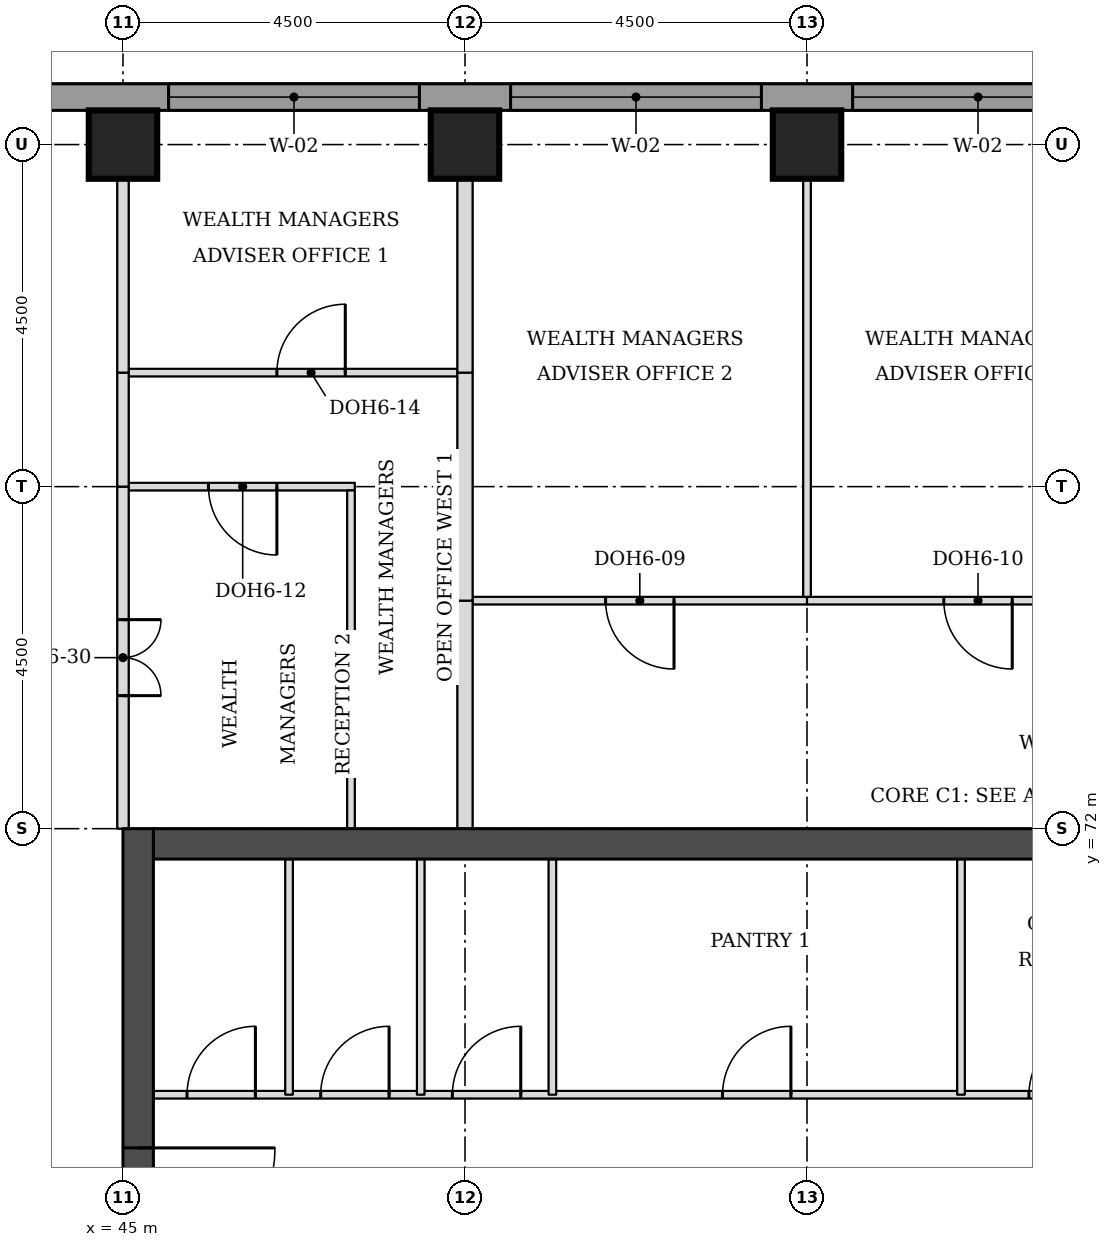
"""IFC4 building model, lengths in metres.
Left out: names, types, materials, properties, quantities, classifications, styles, units other than length and angle.
Written with IfcOpenShell. Run it as: python <this file> out.ifc"""

import sys

from ifc_helpers import new_model, si_unit, direction, frame, frame_2d, origin, origin_2d, place, context, subcontext, project, spatial, rectangle, extrude, element, fill, save


model = new_model("IFC4")
c1 = context("Model", 3, precision=1e-05, world=origin(), true_north=direction((0.0, 1.0)))
c2 = subcontext(c1, "Body", "Model", "MODEL_VIEW")
j1 = project(units=[si_unit("LENGTHUNIT", "METRE"), si_unit("PLANEANGLEUNIT", "RADIAN")], contexts=[c1])
p1 = place(None, origin())
s1 = spatial("IfcSite", under=j1, at=p1, CompositionType="ELEMENT")
p2 = place(p1, origin())
s2 = spatial("IfcBuilding", under=s1, at=p2, CompositionType="ELEMENT")
p3 = place(p2, frame((0.0, 0.0, 184.7)))
s3 = spatial("IfcBuildingStorey", under=s2, at=p3, CompositionType="ELEMENT", Elevation=184.7)
for number, where, z_axis, x_axis in (
    (1, (45.0, 81.0, 0.0), (0.0, 0.0, 1.0), (1.0, 0.0, 0.0)),
    (2, (49.5, 81.0, 0.0), (0.0, 0.0, 1.0), (1.0, 0.0, 0.0)),
    (3, (54.0, 81.0, 0.0), (0.0, 0.0, 1.0), (1.0, 0.0, 0.0)),
):
    element("IfcColumn", number, at=place(p3, frame(where, z_axis=z_axis, x_axis=x_axis)), inside=s3, PredefinedType="COLUMN", context=c2, shape_type="SweptSolid", body=[
        extrude(rectangle(XDim=0.9, YDim=0.9, at=origin_2d()), origin(), (0.0, 0.0, 1.0), 3.7),
    ])
p4 = place(p3, frame((45.4, 71.8, 0.0), z_axis=(0.0, 0.0, 1.0), x_axis=(1.0, 0.0, 0.0)))
e4 = element("IfcWall", 4, at=p4, inside=s3, PredefinedType="SHEAR", context=c2, shape_type="SweptSolid", body=[
    extrude(rectangle(XDim=21.7, YDim=0.4, at=frame_2d((10.85, 0.0))), origin(), (0.0, 0.0, 1.0), 3.7),
])
p5 = place(p3, frame((45.2, 49.5, 0.0), z_axis=(0.0, 0.0, 1.0), x_axis=(0.0, 1.0, 0.0)))
e5 = element("IfcWall", 5, at=p5, inside=s3, PredefinedType="SHEAR", context=c2, shape_type="SweptSolid", body=[
    extrude(rectangle(XDim=22.5, YDim=0.4, at=frame_2d((11.25, 0.0))), origin(), (0.0, 0.0, 1.0), 3.7),
])
p6 = place(p5, frame((4.2, 0.0, 0.0)))
e6 = element("IfcOpeningElement", 6, at=p6, cuts=e5, PredefinedType="OPENING", context=c2, shape_type="SweptSolid", body=[
    extrude(rectangle(XDim=1.8, YDim=2.1, at=frame_2d((0.9, 1.05))), frame((0.0, 0.21, 0.0), z_axis=(0.0, -1.0, 0.0), x_axis=(1.0, 0.0, 0.0)), (0.0, 0.0, 1.0), 0.42),
])
p7 = place(p5, frame((6.9, 0.0, 0.0)))
e7 = element("IfcOpeningElement", 7, at=p7, cuts=e5, PredefinedType="OPENING", context=c2, shape_type="SweptSolid", body=[
    extrude(rectangle(XDim=1.1, YDim=2.1, at=frame_2d((0.55, 1.05))), frame((0.0, 0.21, 0.0), z_axis=(0.0, -1.0, 0.0), x_axis=(1.0, 0.0, 0.0)), (0.0, 0.0, 1.0), 0.42),
])
p8 = place(p5, frame((13.6, 0.0, 0.0)))
e8 = element("IfcOpeningElement", 8, at=p8, cuts=e5, PredefinedType="OPENING", context=c2, shape_type="SweptSolid", body=[
    extrude(rectangle(XDim=1.1, YDim=2.1, at=frame_2d((0.55, 1.05))), frame((0.0, 0.21, 0.0), z_axis=(0.0, -1.0, 0.0), x_axis=(1.0, 0.0, 0.0)), (0.0, 0.0, 1.0), 0.42),
])
p9 = place(p5, frame((16.5, 0.0, 0.0)))
e9 = element("IfcOpeningElement", 9, at=p9, cuts=e5, PredefinedType="OPENING", context=c2, shape_type="SweptSolid", body=[
    extrude(rectangle(XDim=1.8, YDim=2.1, at=frame_2d((0.9, 1.05))), frame((0.0, 0.21, 0.0), z_axis=(0.0, -1.0, 0.0), x_axis=(1.0, 0.0, 0.0)), (0.0, 0.0, 1.0), 0.42),
])
p10 = place(p3, frame((72.331, 81.625, 0.0), z_axis=(0.0, 0.0, 1.0), x_axis=(-1.0, 0.0, 0.0)))
e10 = element("IfcWall", 10, at=p10, inside=s3, PredefinedType="STANDARD", context=c2, shape_type="SweptSolid", body=[
    extrude(rectangle(XDim=32.163, YDim=0.35, at=frame_2d((16.081, 0.0))), origin(), (0.0, 0.0, 1.0), 3.525),
])
p11 = place(p10, frame((5.431, 0.0, 0.9)))
e11 = element("IfcOpeningElement", 11, at=p11, cuts=e10, PredefinedType="OPENING", context=c2, shape_type="SweptSolid", body=[
    extrude(rectangle(XDim=3.3, YDim=1.9, at=frame_2d((1.65, 0.95))), frame((0.0, 0.185, 0.0), z_axis=(0.0, -1.0, 0.0), x_axis=(1.0, 0.0, 0.0)), (0.0, 0.0, 1.0), 0.37),
])
p12 = place(p10, frame((9.931, 0.0, 0.9)))
e12 = element("IfcOpeningElement", 12, at=p12, cuts=e10, PredefinedType="OPENING", context=c2, shape_type="SweptSolid", body=[
    extrude(rectangle(XDim=3.3, YDim=1.9, at=frame_2d((1.65, 0.95))), frame((0.0, 0.185, 0.0), z_axis=(0.0, -1.0, 0.0), x_axis=(1.0, 0.0, 0.0)), (0.0, 0.0, 1.0), 0.37),
])
p13 = place(p10, frame((14.431, 0.0, 0.9)))
e13 = element("IfcOpeningElement", 13, at=p13, cuts=e10, PredefinedType="OPENING", context=c2, shape_type="SweptSolid", body=[
    extrude(rectangle(XDim=3.3, YDim=1.9, at=frame_2d((1.65, 0.95))), frame((0.0, 0.185, 0.0), z_axis=(0.0, -1.0, 0.0), x_axis=(1.0, 0.0, 0.0)), (0.0, 0.0, 1.0), 0.37),
])
p14 = place(p10, frame((18.931, 0.0, 0.9)))
e14 = element("IfcOpeningElement", 14, at=p14, cuts=e10, PredefinedType="OPENING", context=c2, shape_type="SweptSolid", body=[
    extrude(rectangle(XDim=3.3, YDim=1.9, at=frame_2d((1.65, 0.95))), frame((0.0, 0.185, 0.0), z_axis=(0.0, -1.0, 0.0), x_axis=(1.0, 0.0, 0.0)), (0.0, 0.0, 1.0), 0.37),
])
p15 = place(p10, frame((23.431, 0.0, 0.9)))
e15 = element("IfcOpeningElement", 15, at=p15, cuts=e10, PredefinedType="OPENING", context=c2, shape_type="SweptSolid", body=[
    extrude(rectangle(XDim=3.3, YDim=1.9, at=frame_2d((1.65, 0.95))), frame((0.0, 0.185, 0.0), z_axis=(0.0, -1.0, 0.0), x_axis=(1.0, 0.0, 0.0)), (0.0, 0.0, 1.0), 0.37),
])
p16 = place(p3, frame((49.6, 75.0, 0.0), z_axis=(0.0, 0.0, 1.0), x_axis=(1.0, 0.0, 0.0)))
e16 = element("IfcWall", 16, at=p16, inside=s3, PredefinedType="PARTITIONING", context=c2, shape_type="SweptSolid", body=[
    extrude(rectangle(XDim=4.4, YDim=0.1, at=frame_2d((2.2, 0.0))), origin(), (0.0, 0.0, 1.0), 3.55),
])
p17 = place(p16, frame((1.75, 0.0, 0.0)))
e17 = element("IfcOpeningElement", 17, at=p17, cuts=e16, PredefinedType="OPENING", context=c2, shape_type="SweptSolid", body=[
    extrude(rectangle(XDim=0.9, YDim=2.1, at=frame_2d((0.45, 1.05))), frame((0.0, 0.06, 0.0), z_axis=(0.0, -1.0, 0.0), x_axis=(1.0, 0.0, 0.0)), (0.0, 0.0, 1.0), 0.12),
])
p18 = place(p3, frame((54.0, 75.0, 0.0), z_axis=(0.0, 0.0, 1.0), x_axis=(1.0, 0.0, 0.0)))
e18 = element("IfcWall", 18, at=p18, inside=s3, PredefinedType="PARTITIONING", context=c2, shape_type="SweptSolid", body=[
    extrude(rectangle(XDim=4.5, YDim=0.1, at=frame_2d((2.25, 0.0))), origin(), (0.0, 0.0, 1.0), 3.55),
])
p19 = place(p18, frame((1.8, 0.0, 0.0)))
e19 = element("IfcOpeningElement", 19, at=p19, cuts=e18, PredefinedType="OPENING", context=c2, shape_type="SweptSolid", body=[
    extrude(rectangle(XDim=0.9, YDim=2.1, at=frame_2d((0.45, 1.05))), frame((0.0, 0.06, 0.0), z_axis=(0.0, -1.0, 0.0), x_axis=(1.0, 0.0, 0.0)), (0.0, 0.0, 1.0), 0.12),
])
p20 = place(p3, frame((45.075, 76.5, 0.0), z_axis=(0.0, 0.0, 1.0), x_axis=(1.0, 0.0, 0.0)))
e20 = element("IfcWall", 20, at=p20, inside=s3, PredefinedType="PARTITIONING", context=c2, shape_type="SweptSolid", body=[
    extrude(rectangle(XDim=2.975, YDim=0.1, at=frame_2d((1.488, 0.0))), origin(), (0.0, 0.0, 1.0), 3.55),
])
p21 = place(p20, frame((1.05, 0.0, 0.0)))
e21 = element("IfcOpeningElement", 21, at=p21, cuts=e20, PredefinedType="OPENING", context=c2, shape_type="SweptSolid", body=[
    extrude(rectangle(XDim=0.9, YDim=2.1, at=frame_2d((0.45, 1.05))), frame((0.0, 0.06, 0.0), z_axis=(0.0, -1.0, 0.0), x_axis=(1.0, 0.0, 0.0)), (0.0, 0.0, 1.0), 0.12),
])
p22 = place(p3, frame((45.075, 78.0, 0.0), z_axis=(0.0, 0.0, 1.0), x_axis=(1.0, 0.0, 0.0)))
e22 = element("IfcWall", 22, at=p22, inside=s3, PredefinedType="PARTITIONING", context=c2, shape_type="SweptSolid", body=[
    extrude(rectangle(XDim=4.325, YDim=0.1, at=frame_2d((2.163, 0.0))), origin(), (0.0, 0.0, 1.0), 3.55),
])
p23 = place(p22, frame((1.95, 0.0, 0.0)))
e23 = element("IfcOpeningElement", 23, at=p23, cuts=e22, PredefinedType="OPENING", context=c2, shape_type="SweptSolid", body=[
    extrude(rectangle(XDim=0.9, YDim=2.1, at=frame_2d((0.45, 1.05))), frame((0.0, 0.06, 0.0), z_axis=(0.0, -1.0, 0.0), x_axis=(1.0, 0.0, 0.0)), (0.0, 0.0, 1.0), 0.12),
])
p24 = place(p3, frame((45.0, 72.0, 0.0), z_axis=(0.0, 0.0, 1.0), x_axis=(0.0, 1.0, 0.0)))
e24 = element("IfcWall", 24, at=p24, inside=s3, PredefinedType="PARTITIONING", context=c2, shape_type="SweptSolid", body=[
    extrude(rectangle(XDim=4.5, YDim=0.15, at=frame_2d((2.25, 0.0))), origin(), (0.0, 0.0, 1.0), 3.022),
])
p25 = place(p24, frame((1.75, 0.0, 0.0)))
e25 = element("IfcOpeningElement", 25, at=p25, cuts=e24, PredefinedType="OPENING", context=c2, shape_type="SweptSolid", body=[
    extrude(rectangle(XDim=1.0, YDim=2.1, at=frame_2d((0.5, 1.05))), frame((0.0, 0.085, 0.0), z_axis=(0.0, -1.0, 0.0), x_axis=(1.0, 0.0, 0.0)), (0.0, 0.0, 1.0), 0.17),
])
p26 = place(p3, frame((48.0, 72.0, 0.0), z_axis=(0.0, 0.0, 1.0), x_axis=(0.0, 1.0, 0.0)))
e26 = element("IfcWall", 26, at=p26, inside=s3, PredefinedType="PARTITIONING", context=c2, shape_type="SweptSolid", body=[
    extrude(rectangle(XDim=4.45, YDim=0.1, at=frame_2d((2.225, 0.0))), origin(), (0.0, 0.0, 1.0), 3.55),
])
for number, where, z_axis, x_axis in (
    (27, (49.5, 72.0, 0.0), (0.0, 0.0, 1.0), (0.0, 1.0, 0.0)),
    (28, (49.5, 75.0, 0.0), (0.0, 0.0, 1.0), (0.0, 1.0, 0.0)),
):
    element("IfcWall", number, at=place(p3, frame(where, z_axis=z_axis, x_axis=x_axis)), inside=s3, PredefinedType="PARTITIONING", context=c2, shape_type="SweptSolid", body=[
        extrude(rectangle(XDim=3.0, YDim=0.2, at=frame_2d((1.5, 0.0))), origin(), (0.0, 0.0, 1.0), 3.55),
    ])
p27 = place(p3, frame((54.0, 75.05, 0.0), z_axis=(0.0, 0.0, 1.0), x_axis=(0.0, 1.0, 0.0)))
e29 = element("IfcWall", 29, at=p27, inside=s3, PredefinedType="PARTITIONING", context=c2, shape_type="SweptSolid", body=[
    extrude(rectangle(XDim=6.4, YDim=0.1, at=frame_2d((3.2, 0.0))), origin(), (0.0, 0.0, 1.0), 3.55),
])
p28 = place(p3, frame((45.0, 76.5, 0.0), z_axis=(0.0, 0.0, 1.0), x_axis=(0.0, 1.0, 0.0)))
e30 = element("IfcWall", 30, at=p28, inside=s3, PredefinedType="PARTITIONING", context=c2, shape_type="SweptSolid", body=[
    extrude(rectangle(XDim=1.5, YDim=0.15, at=frame_2d((0.75, 0.0))), origin(), (0.0, 0.0, 1.0), 3.022),
])
p29 = place(p3, frame((45.0, 78.0, 0.0), z_axis=(0.0, 0.0, 1.0), x_axis=(0.0, 1.0, 0.0)))
e31 = element("IfcWall", 31, at=p29, inside=s3, PredefinedType="PARTITIONING", context=c2, shape_type="SweptSolid", body=[
    extrude(rectangle(XDim=3.45, YDim=0.15, at=frame_2d((1.725, 0.0))), origin(), (0.0, 0.0, 1.0), 3.022),
])
p30 = place(p3, frame((49.5, 78.0, 0.0), z_axis=(0.0, 0.0, 1.0), x_axis=(0.0, 1.0, 0.0)))
e32 = element("IfcWall", 32, at=p30, inside=s3, PredefinedType="PARTITIONING", context=c2, shape_type="SweptSolid", body=[
    extrude(rectangle(XDim=3.45, YDim=0.2, at=frame_2d((1.725, 0.0))), origin(), (0.0, 0.0, 1.0), 3.55),
])
p31 = place(p3, frame((45.4, 68.5, 0.0), z_axis=(0.0, 0.0, 1.0), x_axis=(1.0, 0.0, 0.0)))
e33 = element("IfcWall", 33, at=p31, inside=s3, PredefinedType="PARTITIONING", context=c2, shape_type="SweptSolid", body=[
    extrude(rectangle(XDim=21.7, YDim=0.1, at=frame_2d((10.85, 0.0))), origin(), (0.0, 0.0, 1.0), 3.55),
])
p32 = place(p31, frame((19.938, 0.0, 0.0)))
e34 = element("IfcOpeningElement", 34, at=p32, cuts=e33, PredefinedType="OPENING", context=c2, shape_type="SweptSolid", body=[
    extrude(rectangle(XDim=0.9, YDim=2.1, at=frame_2d((0.45, 1.05))), frame((0.0, 0.06, 0.0), z_axis=(0.0, -1.0, 0.0), x_axis=(1.0, 0.0, 0.0)), (0.0, 0.0, 1.0), 0.12),
])
p33 = place(p31, frame((17.312, 0.0, 0.0)))
e35 = element("IfcOpeningElement", 35, at=p33, cuts=e33, PredefinedType="OPENING", context=c2, shape_type="SweptSolid", body=[
    extrude(rectangle(XDim=0.9, YDim=2.1, at=frame_2d((0.45, 1.05))), frame((0.0, 0.06, 0.0), z_axis=(0.0, -1.0, 0.0), x_axis=(1.0, 0.0, 0.0)), (0.0, 0.0, 1.0), 0.12),
])
p34 = place(p31, frame((0.442, 0.0, 0.0)))
e36 = element("IfcOpeningElement", 36, at=p34, cuts=e33, PredefinedType="OPENING", context=c2, shape_type="SweptSolid", body=[
    extrude(rectangle(XDim=0.9, YDim=2.1, at=frame_2d((0.45, 1.05))), frame((0.0, 0.06, 0.0), z_axis=(0.0, -1.0, 0.0), x_axis=(1.0, 0.0, 0.0)), (0.0, 0.0, 1.0), 0.12),
])
p35 = place(p31, frame((2.201, 0.0, 0.0)))
e37 = element("IfcOpeningElement", 37, at=p35, cuts=e33, PredefinedType="OPENING", context=c2, shape_type="SweptSolid", body=[
    extrude(rectangle(XDim=0.9, YDim=2.1, at=frame_2d((0.45, 1.05))), frame((0.0, 0.06, 0.0), z_axis=(0.0, -1.0, 0.0), x_axis=(1.0, 0.0, 0.0)), (0.0, 0.0, 1.0), 0.12),
])
p36 = place(p31, frame((3.934, 0.0, 0.0)))
e38 = element("IfcOpeningElement", 38, at=p36, cuts=e33, PredefinedType="OPENING", context=c2, shape_type="SweptSolid", body=[
    extrude(rectangle(XDim=0.9, YDim=2.1, at=frame_2d((0.45, 1.05))), frame((0.0, 0.06, 0.0), z_axis=(0.0, -1.0, 0.0), x_axis=(1.0, 0.0, 0.0)), (0.0, 0.0, 1.0), 0.12),
])
p37 = place(p31, frame((14.432, 0.0, 0.0)))
e39 = element("IfcOpeningElement", 39, at=p37, cuts=e33, PredefinedType="OPENING", context=c2, shape_type="SweptSolid", body=[
    extrude(rectangle(XDim=0.9, YDim=2.1, at=frame_2d((0.45, 1.05))), frame((0.0, 0.06, 0.0), z_axis=(0.0, -1.0, 0.0), x_axis=(1.0, 0.0, 0.0)), (0.0, 0.0, 1.0), 0.12),
])
p38 = place(p31, frame((11.52, 0.0, 0.0)))
e40 = element("IfcOpeningElement", 40, at=p38, cuts=e33, PredefinedType="OPENING", context=c2, shape_type="SweptSolid", body=[
    extrude(rectangle(XDim=0.9, YDim=2.1, at=frame_2d((0.45, 1.05))), frame((0.0, 0.06, 0.0), z_axis=(0.0, -1.0, 0.0), x_axis=(1.0, 0.0, 0.0)), (0.0, 0.0, 1.0), 0.12),
])
p39 = place(p31, frame((7.488, 0.0, 0.0)))
e41 = element("IfcOpeningElement", 41, at=p39, cuts=e33, PredefinedType="OPENING", context=c2, shape_type="SweptSolid", body=[
    extrude(rectangle(XDim=0.9, YDim=2.1, at=frame_2d((0.45, 1.05))), frame((0.0, 0.06, 0.0), z_axis=(0.0, -1.0, 0.0), x_axis=(1.0, 0.0, 0.0)), (0.0, 0.0, 1.0), 0.12),
])
for number, where, z_axis, x_axis in (
    (42, (47.185, 68.5, 0.0), (0.0, 0.0, 1.0), (0.0, 1.0, 0.0)),
    (43, (48.917, 68.5, 0.0), (0.0, 0.0, 1.0), (0.0, 1.0, 0.0)),
    (44, (50.65, 68.5, 0.0), (0.0, 0.0, 1.0), (0.0, 1.0, 0.0)),
    (45, (56.026, 68.5, 0.0), (0.0, 0.0, 1.0), (0.0, 1.0, 0.0)),
):
    element("IfcWall", number, at=place(p3, frame(where, z_axis=z_axis, x_axis=x_axis)), inside=s3, PredefinedType="PARTITIONING", context=c2, shape_type="SweptSolid", body=[
        extrude(rectangle(XDim=3.1, YDim=0.1, at=frame_2d((1.55, 0.0))), origin(), (0.0, 0.0, 1.0), 3.55),
    ])
p40 = place(p13, origin())
e46 = element("IfcWindow", 46, at=p40, inside=s3, PartitioningType="SINGLE_PANEL", PredefinedType="WINDOW", context=c2, shape_type="SweptSolid", body=[
    extrude(rectangle(XDim=3.3, YDim=1.9, at=frame_2d((1.65, 0.95))), frame((0.0, 0.085, 0.0), z_axis=(0.0, -1.0, 0.0), x_axis=(1.0, 0.0, 0.0)), (0.0, 0.0, 1.0), 0.06),
])
fill(e13, e46)
p41 = place(p14, origin())
e47 = element("IfcWindow", 47, at=p41, inside=s3, PartitioningType="SINGLE_PANEL", PredefinedType="WINDOW", context=c2, shape_type="SweptSolid", body=[
    extrude(rectangle(XDim=3.3, YDim=1.9, at=frame_2d((1.65, 0.95))), frame((0.0, 0.085, 0.0), z_axis=(0.0, -1.0, 0.0), x_axis=(1.0, 0.0, 0.0)), (0.0, 0.0, 1.0), 0.06),
])
fill(e14, e47)
p42 = place(p15, origin())
e48 = element("IfcWindow", 48, at=p42, inside=s3, PartitioningType="SINGLE_PANEL", PredefinedType="WINDOW", context=c2, shape_type="SweptSolid", body=[
    extrude(rectangle(XDim=3.3, YDim=1.9, at=frame_2d((1.65, 0.95))), frame((0.0, 0.085, 0.0), z_axis=(0.0, -1.0, 0.0), x_axis=(1.0, 0.0, 0.0)), (0.0, 0.0, 1.0), 0.06),
])
fill(e15, e48)
p43 = place(p25, frame((1.0, 0.0, 0.0), z_axis=(0.0, 0.0, 1.0), x_axis=(-1.0, 0.0, 0.0)))
e49 = element("IfcDoor", 49, at=p43, inside=s3, OperationType="DOUBLE_DOOR_SINGLE_SWING", PredefinedType="DOOR", context=c2, shape_type="SweptSolid", body=[
    extrude(rectangle(XDim=1.0, YDim=2.1, at=frame_2d((0.5, 1.05))), frame((0.0, 0.025, 0.0), z_axis=(0.0, -1.0, 0.0), x_axis=(1.0, 0.0, 0.0)), (0.0, 0.0, 1.0), 0.05),
])
fill(e25, e49)
p44 = place(p21, frame((0.9, 0.0, 0.0), z_axis=(0.0, 0.0, 1.0), x_axis=(-1.0, 0.0, 0.0)))
e50 = element("IfcDoor", 50, at=p44, inside=s3, OperationType="SINGLE_SWING_LEFT", PredefinedType="DOOR", context=c2, shape_type="SweptSolid", body=[
    extrude(rectangle(XDim=0.9, YDim=2.1, at=frame_2d((0.45, 1.05))), frame((0.0, 0.025, 0.0), z_axis=(0.0, -1.0, 0.0), x_axis=(1.0, 0.0, 0.0)), (0.0, 0.0, 1.0), 0.05),
])
fill(e21, e50)
p45 = place(p23, origin())
e51 = element("IfcDoor", 51, at=p45, inside=s3, OperationType="SINGLE_SWING_RIGHT", PredefinedType="DOOR", context=c2, shape_type="SweptSolid", body=[
    extrude(rectangle(XDim=0.9, YDim=2.1, at=frame_2d((0.45, 1.05))), frame((0.0, 0.025, 0.0), z_axis=(0.0, -1.0, 0.0), x_axis=(1.0, 0.0, 0.0)), (0.0, 0.0, 1.0), 0.05),
])
fill(e23, e51)
p46 = place(p17, frame((0.9, 0.0, 0.0), z_axis=(0.0, 0.0, 1.0), x_axis=(-1.0, 0.0, 0.0)))
e52 = element("IfcDoor", 52, at=p46, inside=s3, OperationType="SINGLE_SWING_LEFT", PredefinedType="DOOR", context=c2, shape_type="SweptSolid", body=[
    extrude(rectangle(XDim=0.9, YDim=2.1, at=frame_2d((0.45, 1.05))), frame((0.0, 0.025, 0.0), z_axis=(0.0, -1.0, 0.0), x_axis=(1.0, 0.0, 0.0)), (0.0, 0.0, 1.0), 0.05),
])
fill(e17, e52)
p47 = place(p19, frame((0.9, 0.0, 0.0), z_axis=(0.0, 0.0, 1.0), x_axis=(-1.0, 0.0, 0.0)))
e53 = element("IfcDoor", 53, at=p47, inside=s3, OperationType="SINGLE_SWING_LEFT", PredefinedType="DOOR", context=c2, shape_type="SweptSolid", body=[
    extrude(rectangle(XDim=0.9, YDim=2.1, at=frame_2d((0.45, 1.05))), frame((0.0, 0.025, 0.0), z_axis=(0.0, -1.0, 0.0), x_axis=(1.0, 0.0, 0.0)), (0.0, 0.0, 1.0), 0.05),
])
fill(e19, e53)
p48 = place(p9, frame((1.8, 0.0, 0.0), z_axis=(0.0, 0.0, 1.0), x_axis=(-1.0, 0.0, 0.0)))
e54 = element("IfcDoor", 54, at=p48, inside=s3, OperationType="SINGLE_SWING_LEFT", PredefinedType="DOOR", context=c2, shape_type="SweptSolid", body=[
    extrude(rectangle(XDim=1.8, YDim=2.1, at=frame_2d((0.9, 1.05))), frame((0.0, 0.025, 0.0), z_axis=(0.0, -1.0, 0.0), x_axis=(1.0, 0.0, 0.0)), (0.0, 0.0, 1.0), 0.05),
])
fill(e9, e54)
p49 = place(p34, origin())
e55 = element("IfcDoor", 55, at=p49, inside=s3, OperationType="SINGLE_SWING_RIGHT", PredefinedType="DOOR", context=c2, shape_type="SweptSolid", body=[
    extrude(rectangle(XDim=0.9, YDim=2.1, at=frame_2d((0.45, 1.05))), frame((0.0, 0.025, 0.0), z_axis=(0.0, -1.0, 0.0), x_axis=(1.0, 0.0, 0.0)), (0.0, 0.0, 1.0), 0.05),
])
fill(e36, e55)
p50 = place(p35, origin())
e56 = element("IfcDoor", 56, at=p50, inside=s3, OperationType="SINGLE_SWING_RIGHT", PredefinedType="DOOR", context=c2, shape_type="SweptSolid", body=[
    extrude(rectangle(XDim=0.9, YDim=2.1, at=frame_2d((0.45, 1.05))), frame((0.0, 0.025, 0.0), z_axis=(0.0, -1.0, 0.0), x_axis=(1.0, 0.0, 0.0)), (0.0, 0.0, 1.0), 0.05),
])
fill(e37, e56)
p51 = place(p36, origin())
e57 = element("IfcDoor", 57, at=p51, inside=s3, OperationType="SINGLE_SWING_RIGHT", PredefinedType="DOOR", context=c2, shape_type="SweptSolid", body=[
    extrude(rectangle(XDim=0.9, YDim=2.1, at=frame_2d((0.45, 1.05))), frame((0.0, 0.025, 0.0), z_axis=(0.0, -1.0, 0.0), x_axis=(1.0, 0.0, 0.0)), (0.0, 0.0, 1.0), 0.05),
])
fill(e38, e57)
p52 = place(p38, origin())
e58 = element("IfcDoor", 58, at=p52, inside=s3, OperationType="SINGLE_SWING_RIGHT", PredefinedType="DOOR", context=c2, shape_type="SweptSolid", body=[
    extrude(rectangle(XDim=0.9, YDim=2.1, at=frame_2d((0.45, 1.05))), frame((0.0, 0.025, 0.0), z_axis=(0.0, -1.0, 0.0), x_axis=(1.0, 0.0, 0.0)), (0.0, 0.0, 1.0), 0.05),
])
fill(e40, e58)
p53 = place(p39, origin())
e59 = element("IfcDoor", 59, at=p53, inside=s3, OperationType="SINGLE_SWING_RIGHT", PredefinedType="DOOR", context=c2, shape_type="SweptSolid", body=[
    extrude(rectangle(XDim=0.9, YDim=2.1, at=frame_2d((0.45, 1.05))), frame((0.0, 0.025, 0.0), z_axis=(0.0, -1.0, 0.0), x_axis=(1.0, 0.0, 0.0)), (0.0, 0.0, 1.0), 0.05),
])
fill(e41, e59)
save(model, sys.argv[1])
